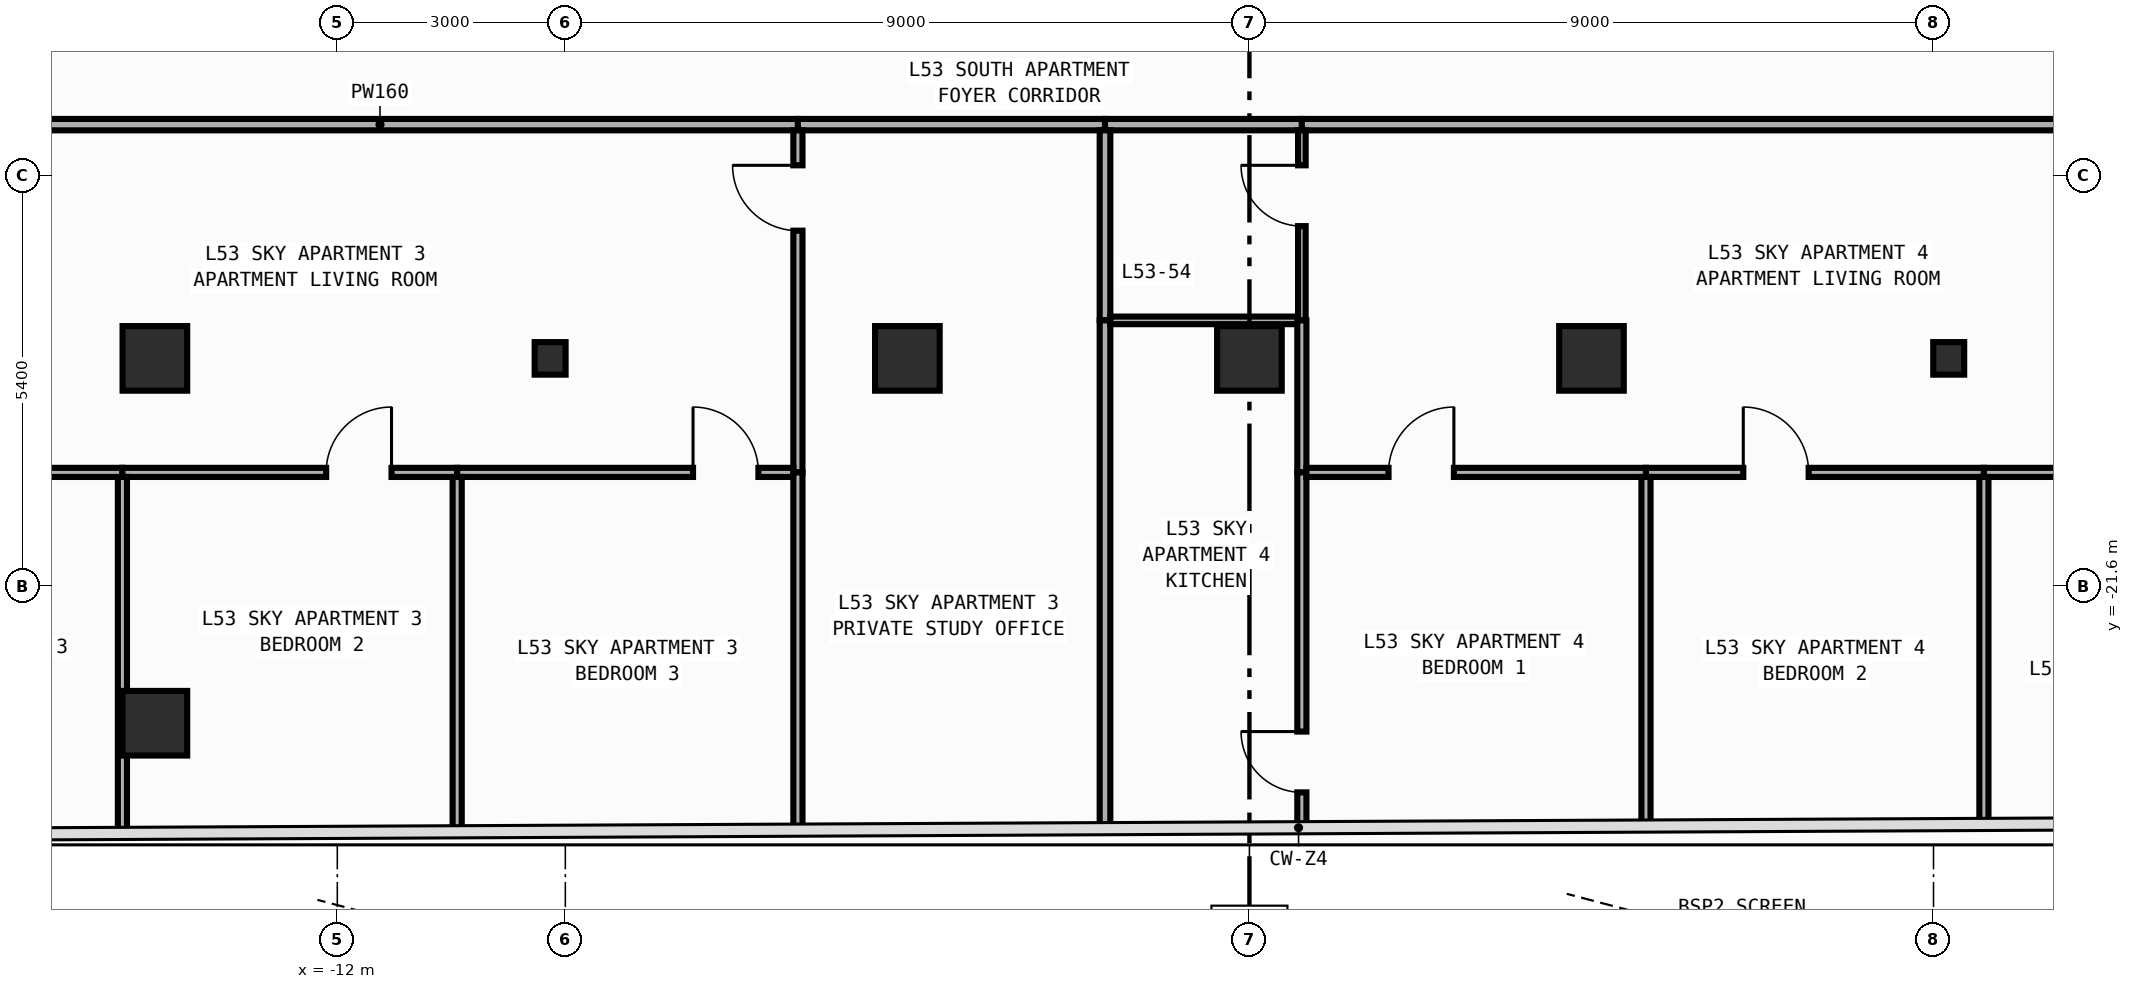
"""IFC4 building model, lengths in metres.
Left out: names, types, materials, properties, quantities, classifications, styles, units other than length and angle.
Written with IfcOpenShell. Run it as: python <this file> out.ifc"""

import sys

from ifc_helpers import new_model, si_unit, direction, frame, frame_2d, origin, origin_2d, place, context, subcontext, project, spatial, rectangle, i_section, extrude, element, fill, save


model = new_model("IFC4")
c1 = context("Model", 3, precision=1e-05, world=origin(), true_north=direction((0.0, 1.0)))
c2 = subcontext(c1, "Body", "Model", "MODEL_VIEW")
j1 = project(units=[si_unit("LENGTHUNIT", "METRE"), si_unit("PLANEANGLEUNIT", "RADIAN")], contexts=[c1])
p1 = place(None, origin())
s1 = spatial("IfcSite", under=j1, at=p1, CompositionType="ELEMENT")
p2 = place(p1, origin())
s2 = spatial("IfcBuilding", under=s1, at=p2, CompositionType="ELEMENT")
p3 = place(p2, frame((0.0, 0.0, 229.6)))
s3 = spatial("IfcBuildingStorey", under=s2, at=p3, CompositionType="ELEMENT", Elevation=229.6)
for number, where, z_axis, x_axis in (
    (1, (-9.2, -18.6, 0.0), (0.0, 0.0, 1.0), (1.0, 0.0, 0.0)),
    (2, (9.2, -18.6, 0.0), (0.0, 0.0, 1.0), (1.0, 0.0, 0.0)),
):
    element("IfcColumn", number, at=place(p3, frame(where, z_axis=z_axis, x_axis=x_axis)), inside=s3, PredefinedType="COLUMN", context=c2, shape_type="SweptSolid", body=[
        extrude(i_section(OverallWidth=0.407, OverallDepth=0.428, WebThickness=0.02, FlangeThickness=0.035, FilletRadius=0.022, at=origin_2d()), origin(), (0.0, 0.0, 1.0), 3.6),
    ])
for number, where, z_axis, x_axis in (
    (3, (-14.4, -18.6, 0.0), (0.0, 0.0, 1.0), (1.0, 0.0, 0.0)),
    (4, (-4.5, -18.6, 0.0), (0.0, 0.0, 1.0), (1.0, 0.0, 0.0)),
    (5, (0.0, -18.6, 0.0), (0.0, 0.0, 1.0), (1.0, 0.0, 0.0)),
    (6, (4.5, -18.6, 0.0), (0.0, 0.0, 1.0), (1.0, 0.0, 0.0)),
    (7, (-14.4, -23.4, 0.0), (0.0, 0.0, 1.0), (1.0, 0.0, 0.0)),
):
    element("IfcColumn", number, at=place(p3, frame(where, z_axis=z_axis, x_axis=x_axis)), inside=s3, PredefinedType="COLUMN", context=c2, shape_type="SweptSolid", body=[
        extrude(rectangle(XDim=0.85, YDim=0.85, at=origin_2d()), origin(), (0.0, 0.0, 1.0), 3.6),
    ])
p4 = place(p3, frame((-19.31, -15.525, 0.0), z_axis=(0.0, 0.0, 1.0), x_axis=(1.0, 0.0, 0.0)))
e8 = element("IfcWall", 8, at=p4, inside=s3, PredefinedType="PARTITIONING", context=c2, shape_type="SweptSolid", body=[
    extrude(rectangle(XDim=13.37, YDim=0.15, at=frame_2d((6.685, 0.0))), origin(), (0.0, 0.0, 1.0), 3.34),
])
p5 = place(p4, frame((1.473, 0.0, 0.0)))
e9 = element("IfcOpeningElement", 9, at=p5, cuts=e8, PredefinedType="OPENING", context=c2, shape_type="SweptSolid", body=[
    extrude(rectangle(XDim=0.9, YDim=2.15, at=frame_2d((0.45, 1.075))), frame((0.0, 0.085, 0.0), z_axis=(0.0, -1.0, 0.0), x_axis=(1.0, 0.0, 0.0)), (0.0, 0.0, 1.0), 0.17),
])
p6 = place(p3, frame((-5.94, -15.525, 0.0), z_axis=(0.0, 0.0, 1.0), x_axis=(1.0, 0.0, 0.0)))
e10 = element("IfcWall", 10, at=p6, inside=s3, PredefinedType="PARTITIONING", context=c2, shape_type="SweptSolid", body=[
    extrude(rectangle(XDim=4.04, YDim=0.15, at=frame_2d((2.02, 0.0))), origin(), (0.0, 0.0, 1.0), 3.34),
])
p7 = place(p3, frame((-1.9, -15.525, 0.0), z_axis=(0.0, 0.0, 1.0), x_axis=(1.0, 0.0, 0.0)))
e11 = element("IfcWall", 11, at=p7, inside=s3, PredefinedType="PARTITIONING", context=c2, shape_type="SweptSolid", body=[
    extrude(rectangle(XDim=2.59, YDim=0.15, at=frame_2d((1.295, 0.0))), origin(), (0.0, 0.0, 1.0), 3.34),
])
p8 = place(p3, frame((0.69, -15.525, 0.0), z_axis=(0.0, 0.0, 1.0), x_axis=(1.0, 0.0, 0.0)))
e12 = element("IfcWall", 12, at=p8, inside=s3, PredefinedType="PARTITIONING", context=c2, shape_type="SweptSolid", body=[
    extrude(rectangle(XDim=11.55, YDim=0.15, at=frame_2d((5.775, 0.0))), origin(), (0.0, 0.0, 1.0), 3.34),
])
p9 = place(p8, frame((10.19, 0.0, 0.0)))
e13 = element("IfcOpeningElement", 13, at=p9, cuts=e12, PredefinedType="OPENING", context=c2, shape_type="SweptSolid", body=[
    extrude(rectangle(XDim=0.9, YDim=2.15, at=frame_2d((0.45, 1.075))), frame((0.0, 0.085, 0.0), z_axis=(0.0, -1.0, 0.0), x_axis=(1.0, 0.0, 0.0)), (0.0, 0.0, 1.0), 0.17),
])
p10 = place(p3, frame((-5.94, -20.1, 0.0), z_axis=(0.0, 0.0, 1.0), x_axis=(0.0, 1.0, 0.0)))
e14 = element("IfcWall", 14, at=p10, inside=s3, PredefinedType="PARTITIONING", context=c2, shape_type="SweptSolid", body=[
    extrude(rectangle(XDim=4.5, YDim=0.12, at=frame_2d((2.25, 0.0))), origin(), (0.0, 0.0, 1.0), 3.34),
])
p11 = place(p10, frame((3.18, 0.0, 0.0)))
e15 = element("IfcOpeningElement", 15, at=p11, cuts=e14, PredefinedType="OPENING", context=c2, shape_type="SweptSolid", body=[
    extrude(rectangle(XDim=0.86, YDim=2.15, at=frame_2d((0.43, 1.075))), frame((0.0, 0.07, 0.0), z_axis=(0.0, -1.0, 0.0), x_axis=(1.0, 0.0, 0.0)), (0.0, 0.0, 1.0), 0.14),
])
p12 = place(p3, frame((-19.25, -20.1, 0.0), z_axis=(0.0, 0.0, 1.0), x_axis=(1.0, 0.0, 0.0)))
e16 = element("IfcWall", 16, at=p12, inside=s3, PredefinedType="PARTITIONING", context=c2, shape_type="SweptSolid", body=[
    extrude(rectangle(XDim=4.423, YDim=0.12, at=frame_2d((2.211, 0.0))), origin(), (0.0, 0.0, 1.0), 3.34),
])
p13 = place(p12, frame((1.477, 0.0, 0.0)))
e17 = element("IfcOpeningElement", 17, at=p13, cuts=e16, PredefinedType="OPENING", context=c2, shape_type="SweptSolid", body=[
    extrude(rectangle(XDim=0.86, YDim=2.15, at=frame_2d((0.43, 1.075))), frame((0.0, 0.07, 0.0), z_axis=(0.0, -1.0, 0.0), x_axis=(1.0, 0.0, 0.0)), (0.0, 0.0, 1.0), 0.14),
])
p14 = place(p3, frame((-14.827, -20.1, 0.0), z_axis=(0.0, 0.0, 1.0), x_axis=(1.0, 0.0, 0.0)))
e18 = element("IfcWall", 18, at=p14, inside=s3, PredefinedType="PARTITIONING", context=c2, shape_type="SweptSolid", body=[
    extrude(rectangle(XDim=4.404, YDim=0.12, at=frame_2d((2.202, 0.0))), origin(), (0.0, 0.0, 1.0), 3.34),
])
p15 = place(p14, frame((2.68, 0.0, 0.0)))
e19 = element("IfcOpeningElement", 19, at=p15, cuts=e18, PredefinedType="OPENING", context=c2, shape_type="SweptSolid", body=[
    extrude(rectangle(XDim=0.86, YDim=2.15, at=frame_2d((0.43, 1.075))), frame((0.0, 0.07, 0.0), z_axis=(0.0, -1.0, 0.0), x_axis=(1.0, 0.0, 0.0)), (0.0, 0.0, 1.0), 0.14),
])
p16 = place(p3, frame((-10.423, -20.1, 0.0), z_axis=(0.0, 0.0, 1.0), x_axis=(1.0, 0.0, 0.0)))
e20 = element("IfcWall", 20, at=p16, inside=s3, PredefinedType="PARTITIONING", context=c2, shape_type="SweptSolid", body=[
    extrude(rectangle(XDim=4.423, YDim=0.12, at=frame_2d((2.211, 0.0))), origin(), (0.0, 0.0, 1.0), 3.34),
])
p17 = place(p16, frame((3.103, 0.0, 0.0)))
e21 = element("IfcOpeningElement", 21, at=p17, cuts=e20, PredefinedType="OPENING", context=c2, shape_type="SweptSolid", body=[
    extrude(rectangle(XDim=0.86, YDim=2.15, at=frame_2d((0.43, 1.075))), frame((0.0, 0.07, 0.0), z_axis=(0.0, -1.0, 0.0), x_axis=(1.0, 0.0, 0.0)), (0.0, 0.0, 1.0), 0.14),
])
p18 = place(p3, frame((-5.94, -24.802, 0.0), z_axis=(0.0, 0.0, 1.0), x_axis=(0.0, 1.0, 0.0)))
e22 = element("IfcWall", 22, at=p18, inside=s3, PredefinedType="PARTITIONING", context=c2, shape_type="SweptSolid", body=[
    extrude(rectangle(XDim=4.702, YDim=0.12, at=frame_2d((2.351, 0.0))), origin(), (0.0, 0.0, 1.0), 3.34),
])
p19 = place(p3, frame((-1.9, -18.1, 0.0), z_axis=(0.0, 0.0, 1.0), x_axis=(0.0, 1.0, 0.0)))
e23 = element("IfcWall", 23, at=p19, inside=s3, PredefinedType="PARTITIONING", context=c2, shape_type="SweptSolid", body=[
    extrude(rectangle(XDim=2.5, YDim=0.14, at=frame_2d((1.25, 0.0))), origin(), (0.0, 0.0, 1.0), 3.34),
])
p20 = place(p3, frame((-1.9, -24.782, 0.0), z_axis=(0.0, 0.0, 1.0), x_axis=(0.0, 1.0, 0.0)))
e24 = element("IfcWall", 24, at=p20, inside=s3, PredefinedType="PARTITIONING", context=c2, shape_type="SweptSolid", body=[
    extrude(rectangle(XDim=6.682, YDim=0.14, at=frame_2d((3.341, 0.0))), origin(), (0.0, 0.0, 1.0), 3.34),
])
p21 = place(p3, frame((-14.827, -24.844, 0.0), z_axis=(0.0, 0.0, 1.0), x_axis=(0.0, 1.0, 0.0)))
e25 = element("IfcWall", 25, at=p21, inside=s3, PredefinedType="PARTITIONING", context=c2, shape_type="SweptSolid", body=[
    extrude(rectangle(XDim=4.685, YDim=0.12, at=frame_2d((2.342, 0.0))), origin(), (0.0, 0.0, 1.0), 2.44),
])
p22 = place(p3, frame((-10.423, -24.823, 0.0), z_axis=(0.0, 0.0, 1.0), x_axis=(0.0, 1.0, 0.0)))
e26 = element("IfcWall", 26, at=p22, inside=s3, PredefinedType="PARTITIONING", context=c2, shape_type="SweptSolid", body=[
    extrude(rectangle(XDim=4.663, YDim=0.12, at=frame_2d((2.332, 0.0))), origin(), (0.0, 0.0, 1.0), 3.34),
])
p23 = place(p3, frame((-1.83, -18.1, 0.0), z_axis=(0.0, 0.0, 1.0), x_axis=(1.0, 0.0, 0.0)))
e27 = element("IfcWall", 27, at=p23, inside=s3, PredefinedType="PARTITIONING", context=c2, shape_type="SweptSolid", body=[
    extrude(rectangle(XDim=2.47, YDim=0.1, at=frame_2d((1.235, 0.0))), origin(), (0.0, 0.0, 1.0), 3.34),
])
p24 = place(p3, frame((0.69, -18.1, 0.0), z_axis=(0.0, 0.0, 1.0), x_axis=(0.0, 1.0, 0.0)))
e28 = element("IfcWall", 28, at=p24, inside=s3, PredefinedType="PARTITIONING", context=c2, shape_type="SweptSolid", body=[
    extrude(rectangle(XDim=2.5, YDim=0.1, at=frame_2d((1.25, 0.0))), origin(), (0.0, 0.0, 1.0), 3.34),
])
p25 = place(p24, frame((1.24, 0.0, 0.0)))
e29 = element("IfcOpeningElement", 29, at=p25, cuts=e28, PredefinedType="OPENING", context=c2, shape_type="SweptSolid", body=[
    extrude(rectangle(XDim=0.8, YDim=2.1, at=frame_2d((0.4, 1.05))), frame((0.0, 0.06, 0.0), z_axis=(0.0, -1.0, 0.0), x_axis=(1.0, 0.0, 0.0)), (0.0, 0.0, 1.0), 0.12),
])
p26 = place(p3, frame((0.69, -20.1, 0.0), z_axis=(0.0, 0.0, 1.0), x_axis=(0.0, 1.0, 0.0)))
e30 = element("IfcWall", 30, at=p26, inside=s3, PredefinedType="PARTITIONING", context=c2, shape_type="SweptSolid", body=[
    extrude(rectangle(XDim=2.0, YDim=0.12, at=frame_2d((1.0, 0.0))), origin(), (0.0, 0.0, 1.0), 3.34),
])
p27 = place(p3, frame((0.69, -24.77, 0.0), z_axis=(0.0, 0.0, 1.0), x_axis=(0.0, 1.0, 0.0)))
e31 = element("IfcWall", 31, at=p27, inside=s3, PredefinedType="PARTITIONING", context=c2, shape_type="SweptSolid", body=[
    extrude(rectangle(XDim=4.67, YDim=0.12, at=frame_2d((2.335, 0.0))), origin(), (0.0, 0.0, 1.0), 3.34),
])
p28 = place(p27, frame((0.46, 0.0, 0.0)))
e32 = element("IfcOpeningElement", 32, at=p28, cuts=e31, PredefinedType="OPENING", context=c2, shape_type="SweptSolid", body=[
    extrude(rectangle(XDim=0.8, YDim=2.1, at=frame_2d((0.4, 1.05))), frame((0.0, 0.07, 0.0), z_axis=(0.0, -1.0, 0.0), x_axis=(1.0, 0.0, 0.0)), (0.0, 0.0, 1.0), 0.14),
])
p29 = place(p3, frame((0.75, -20.1, 0.0), z_axis=(0.0, 0.0, 1.0), x_axis=(1.0, 0.0, 0.0)))
e33 = element("IfcWall", 33, at=p29, inside=s3, PredefinedType="PARTITIONING", context=c2, shape_type="SweptSolid", body=[
    extrude(rectangle(XDim=4.467, YDim=0.12, at=frame_2d((2.233, 0.0))), origin(), (0.0, 0.0, 1.0), 3.34),
])
p30 = place(p29, frame((1.08, 0.0, 0.0)))
e34 = element("IfcOpeningElement", 34, at=p30, cuts=e33, PredefinedType="OPENING", context=c2, shape_type="SweptSolid", body=[
    extrude(rectangle(XDim=0.86, YDim=2.15, at=frame_2d((0.43, 1.075))), frame((0.0, 0.07, 0.0), z_axis=(0.0, -1.0, 0.0), x_axis=(1.0, 0.0, 0.0)), (0.0, 0.0, 1.0), 0.14),
])
p31 = place(p3, frame((5.217, -20.1, 0.0), z_axis=(0.0, 0.0, 1.0), x_axis=(1.0, 0.0, 0.0)))
e35 = element("IfcWall", 35, at=p31, inside=s3, PredefinedType="PARTITIONING", context=c2, shape_type="SweptSolid", body=[
    extrude(rectangle(XDim=4.446, YDim=0.12, at=frame_2d((2.223, 0.0))), origin(), (0.0, 0.0, 1.0), 3.34),
])
p32 = place(p31, frame((1.28, 0.0, 0.0)))
e36 = element("IfcOpeningElement", 36, at=p32, cuts=e35, PredefinedType="OPENING", context=c2, shape_type="SweptSolid", body=[
    extrude(rectangle(XDim=0.86, YDim=2.15, at=frame_2d((0.43, 1.075))), frame((0.0, 0.07, 0.0), z_axis=(0.0, -1.0, 0.0), x_axis=(1.0, 0.0, 0.0)), (0.0, 0.0, 1.0), 0.14),
])
p33 = place(p3, frame((9.663, -20.1, 0.0), z_axis=(0.0, 0.0, 1.0), x_axis=(1.0, 0.0, 0.0)))
e37 = element("IfcWall", 37, at=p33, inside=s3, PredefinedType="PARTITIONING", context=c2, shape_type="SweptSolid", body=[
    extrude(rectangle(XDim=4.587, YDim=0.12, at=frame_2d((2.293, 0.0))), origin(), (0.0, 0.0, 1.0), 3.34),
])
p34 = place(p33, frame((1.262, 0.0, 0.0)))
e38 = element("IfcOpeningElement", 38, at=p34, cuts=e37, PredefinedType="OPENING", context=c2, shape_type="SweptSolid", body=[
    extrude(rectangle(XDim=0.86, YDim=2.15, at=frame_2d((0.43, 1.075))), frame((0.0, 0.07, 0.0), z_axis=(0.0, -1.0, 0.0), x_axis=(1.0, 0.0, 0.0)), (0.0, 0.0, 1.0), 0.14),
])
p35 = place(p3, frame((5.217, -24.748, 0.0), z_axis=(0.0, 0.0, 1.0), x_axis=(0.0, 1.0, 0.0)))
e39 = element("IfcWall", 39, at=p35, inside=s3, PredefinedType="PARTITIONING", context=c2, shape_type="SweptSolid", body=[
    extrude(rectangle(XDim=4.588, YDim=0.12, at=frame_2d((2.294, 0.0))), origin(), (0.0, 0.0, 1.0), 3.34),
])
p36 = place(p3, frame((9.663, -24.726, 0.0), z_axis=(0.0, 0.0, 1.0), x_axis=(0.0, 1.0, 0.0)))
e40 = element("IfcWall", 40, at=p36, inside=s3, PredefinedType="PARTITIONING", context=c2, shape_type="SweptSolid", body=[
    extrude(rectangle(XDim=4.566, YDim=0.12, at=frame_2d((2.283, 0.0))), origin(), (0.0, 0.0, 1.0), 3.34),
])
p37 = place(p11, origin())
e41 = element("IfcDoor", 41, at=p37, inside=s3, OperationType="SINGLE_SWING_RIGHT", PredefinedType="DOOR", context=c2, shape_type="SweptSolid", body=[
    extrude(rectangle(XDim=0.86, YDim=2.15, at=frame_2d((0.43, 1.075))), frame((0.0, 0.025, 0.0), z_axis=(0.0, -1.0, 0.0), x_axis=(1.0, 0.0, 0.0)), (0.0, 0.0, 1.0), 0.05),
])
fill(e15, e41)
p38 = place(p15, origin())
e42 = element("IfcDoor", 42, at=p38, inside=s3, OperationType="SINGLE_SWING_RIGHT", PredefinedType="DOOR", context=c2, shape_type="SweptSolid", body=[
    extrude(rectangle(XDim=0.86, YDim=2.15, at=frame_2d((0.43, 1.075))), frame((0.0, 0.025, 0.0), z_axis=(0.0, -1.0, 0.0), x_axis=(1.0, 0.0, 0.0)), (0.0, 0.0, 1.0), 0.05),
])
fill(e19, e42)
p39 = place(p17, origin())
e43 = element("IfcDoor", 43, at=p39, inside=s3, OperationType="SINGLE_SWING_LEFT", PredefinedType="DOOR", context=c2, shape_type="SweptSolid", body=[
    extrude(rectangle(XDim=0.86, YDim=2.15, at=frame_2d((0.43, 1.075))), frame((0.0, 0.025, 0.0), z_axis=(0.0, -1.0, 0.0), x_axis=(1.0, 0.0, 0.0)), (0.0, 0.0, 1.0), 0.05),
])
fill(e21, e43)
p40 = place(p25, origin())
e44 = element("IfcDoor", 44, at=p40, inside=s3, OperationType="SINGLE_SWING_RIGHT", PredefinedType="DOOR", context=c2, shape_type="SweptSolid", body=[
    extrude(rectangle(XDim=0.8, YDim=2.1, at=frame_2d((0.4, 1.05))), frame((0.0, 0.025, 0.0), z_axis=(0.0, -1.0, 0.0), x_axis=(1.0, 0.0, 0.0)), (0.0, 0.0, 1.0), 0.05),
])
fill(e29, e44)
p41 = place(p30, origin())
e45 = element("IfcDoor", 45, at=p41, inside=s3, OperationType="SINGLE_SWING_RIGHT", PredefinedType="DOOR", context=c2, shape_type="SweptSolid", body=[
    extrude(rectangle(XDim=0.86, YDim=2.15, at=frame_2d((0.43, 1.075))), frame((0.0, 0.025, 0.0), z_axis=(0.0, -1.0, 0.0), x_axis=(1.0, 0.0, 0.0)), (0.0, 0.0, 1.0), 0.05),
])
fill(e34, e45)
p42 = place(p32, origin())
e46 = element("IfcDoor", 46, at=p42, inside=s3, OperationType="SINGLE_SWING_LEFT", PredefinedType="DOOR", context=c2, shape_type="SweptSolid", body=[
    extrude(rectangle(XDim=0.86, YDim=2.15, at=frame_2d((0.43, 1.075))), frame((0.0, 0.025, 0.0), z_axis=(0.0, -1.0, 0.0), x_axis=(1.0, 0.0, 0.0)), (0.0, 0.0, 1.0), 0.05),
])
fill(e36, e46)
p43 = place(p28, origin())
e47 = element("IfcDoor", 47, at=p43, inside=s3, OperationType="SINGLE_SWING_RIGHT", PredefinedType="DOOR", context=c2, shape_type="SweptSolid", body=[
    extrude(rectangle(XDim=0.8, YDim=2.1, at=frame_2d((0.4, 1.05))), frame((0.0, 0.025, 0.0), z_axis=(0.0, -1.0, 0.0), x_axis=(1.0, 0.0, 0.0)), (0.0, 0.0, 1.0), 0.05),
])
fill(e32, e47)
save(model, sys.argv[1])
